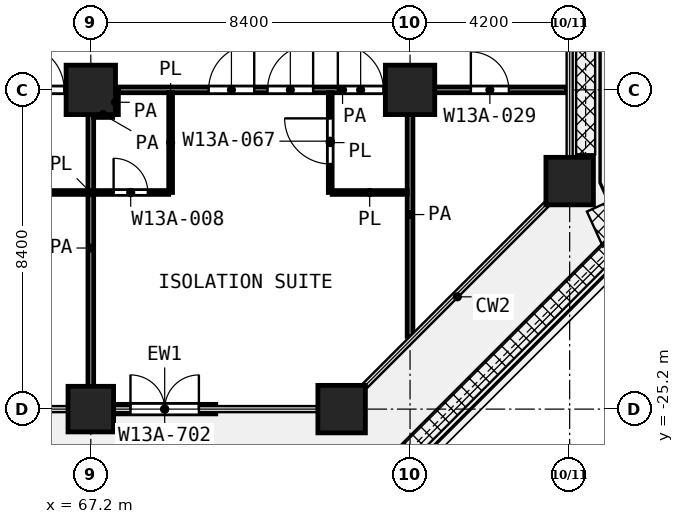
"""IFC4 building model, lengths in metres.
Left out: names, types, materials, properties, quantities, classifications, styles, units other than length and angle.
Written with IfcOpenShell. Run it as: python <this file> out.ifc"""

import sys

from ifc_helpers import new_model, si_unit, direction, frame, frame_2d, origin, origin_2d, place, context, subcontext, project, spatial, rectangle, extrude, element, fill, save


model = new_model("IFC4")
c1 = context("Model", 3, precision=1e-05, world=origin(), true_north=direction((0.0, 1.0)))
c2 = subcontext(c1, "Body", "Model", "MODEL_VIEW")
j1 = project(units=[si_unit("LENGTHUNIT", "METRE"), si_unit("PLANEANGLEUNIT", "RADIAN")], contexts=[c1])
p1 = place(None, origin())
s1 = spatial("IfcSite", under=j1, at=p1, CompositionType="ELEMENT")
p2 = place(p1, origin())
s2 = spatial("IfcBuilding", under=s1, at=p2, CompositionType="ELEMENT")
p3 = place(p2, frame((0.0, 0.0, 60.2)))
s3 = spatial("IfcBuildingStorey", under=s2, at=p3, CompositionType="ELEMENT", Elevation=60.2)
for number, where, z_axis, x_axis in (
    (1, (67.2, -16.8, 0.0), (0.0, 0.0, 1.0), (1.0, 0.0, 0.0)),
    (2, (75.6, -16.8, 0.0), (0.0, 0.0, 1.0), (1.0, 0.0, 0.0)),
):
    element("IfcColumn", number, at=place(p3, frame(where, z_axis=z_axis, x_axis=x_axis)), inside=s3, PredefinedType="COLUMN", context=c2, shape_type="SweptSolid", body=[
        extrude(rectangle(XDim=1.3, YDim=1.3, at=origin_2d()), origin(), (0.0, 0.0, 1.0), 4.2),
    ])
p4 = place(p3, frame((79.8, -19.2, 0.0), z_axis=(0.0, 0.0, 1.0), x_axis=(1.0, 0.0, 0.0)))
e3 = element("IfcColumn", 3, at=p4, inside=s3, PredefinedType="COLUMN", context=c2, shape_type="SweptSolid", body=[
    extrude(rectangle(XDim=1.25, YDim=1.25, at=origin_2d()), origin(), (0.0, 0.0, 1.0), 4.2),
])
p5 = place(p3, frame((67.2, -25.2, 0.0), z_axis=(0.0, 0.0, 1.0), x_axis=(1.0, 0.0, 0.0)))
e4 = element("IfcColumn", 4, at=p5, inside=s3, PredefinedType="COLUMN", context=c2, shape_type="SweptSolid", body=[
    extrude(rectangle(XDim=1.2, YDim=1.2, at=origin_2d()), origin(), (0.0, 0.0, 1.0), 4.2),
])
p6 = place(p3, frame((73.8, -25.2, 0.0), z_axis=(0.0, 0.0, 1.0), x_axis=(1.0, 0.0, 0.0)))
e5 = element("IfcColumn", 5, at=p6, inside=s3, PredefinedType="COLUMN", context=c2, shape_type="SweptSolid", body=[
    extrude(rectangle(XDim=1.25, YDim=1.25, at=origin_2d()), origin(), (0.0, 0.0, 1.0), 4.2),
])
p7 = place(p3, frame((67.8, -25.2, 0.0), z_axis=(0.0, 0.0, 1.0), x_axis=(1.0, 0.0, 0.0)))
e6 = element("IfcWall", 6, at=p7, inside=s3, PredefinedType="SOLIDWALL", context=c2, shape_type="SweptSolid", body=[
    extrude(rectangle(XDim=2.688, YDim=0.25, at=frame_2d((1.344, 0.0))), origin(), (0.0, 0.0, 1.0), 3.78),
])
p8 = place(p7, frame((0.444, 0.0, 0.0)))
e7 = element("IfcOpeningElement", 7, at=p8, cuts=e6, PredefinedType="OPENING", context=c2, shape_type="SweptSolid", body=[
    extrude(rectangle(XDim=1.8, YDim=2.1, at=frame_2d((0.9, 1.05))), frame((0.0, 0.135, 0.0), z_axis=(0.0, -1.0, 0.0), x_axis=(1.0, 0.0, 0.0)), (0.0, 0.0, 1.0), 0.27),
])
p9 = place(p3, frame((65.15, -19.5, 0.0), z_axis=(0.0, 0.0, 1.0), x_axis=(1.0, 0.0, 0.0)))
e8 = element("IfcWall", 8, at=p9, inside=s3, PredefinedType="PARTITIONING", context=c2, shape_type="SweptSolid", body=[
    extrude(rectangle(XDim=4.1, YDim=0.1, at=frame_2d((2.05, 0.0))), origin(), (0.0, 0.0, 1.0), 3.9),
])
p10 = place(p9, frame((2.65, 0.0, 0.0)))
e9 = element("IfcOpeningElement", 9, at=p10, cuts=e8, PredefinedType="OPENING", context=c2, shape_type="SweptSolid", body=[
    extrude(rectangle(XDim=0.9, YDim=2.1, at=frame_2d((0.45, 1.05))), frame((0.0, 0.06, 0.0), z_axis=(0.0, -1.0, 0.0), x_axis=(1.0, 0.0, 0.0)), (0.0, 0.0, 1.0), 0.12),
])
p11 = place(p3, frame((73.55, -19.5, 0.0), z_axis=(0.0, 0.0, 1.0), x_axis=(1.0, 0.0, 0.0)))
e10 = element("IfcWall", 10, at=p11, inside=s3, PredefinedType="PARTITIONING", context=c2, shape_type="SweptSolid", body=[
    extrude(rectangle(XDim=1.975, YDim=0.1, at=frame_2d((0.987, 0.0))), origin(), (0.0, 0.0, 1.0), 3.9),
])
p12 = place(p3, frame((69.3, -19.5, 0.0), z_axis=(0.0, 0.0, 1.0), x_axis=(0.0, 1.0, 0.0)))
e11 = element("IfcWall", 11, at=p12, inside=s3, PredefinedType="PARTITIONING", context=c2, shape_type="SweptSolid", body=[
    extrude(rectangle(XDim=2.625, YDim=0.1, at=frame_2d((1.312, 0.0))), origin(), (0.0, 0.0, 1.0), 3.9),
])
p13 = place(p3, frame((73.5, -19.5, 0.0), z_axis=(0.0, 0.0, 1.0), x_axis=(0.0, 1.0, 0.0)))
e12 = element("IfcWall", 12, at=p13, inside=s3, PredefinedType="PARTITIONING", context=c2, shape_type="SweptSolid", body=[
    extrude(rectangle(XDim=2.625, YDim=0.1, at=frame_2d((1.312, 0.0))), origin(), (0.0, 0.0, 1.0), 3.9),
])
p14 = place(p13, frame((0.75, 0.0, 0.0)))
e13 = element("IfcOpeningElement", 13, at=p14, cuts=e12, PredefinedType="OPENING", context=c2, shape_type="SweptSolid", body=[
    extrude(rectangle(XDim=1.2, YDim=2.1, at=frame_2d((0.6, 1.05))), frame((0.0, 0.06, 0.0), z_axis=(0.0, -1.0, 0.0), x_axis=(1.0, 0.0, 0.0)), (0.0, 0.0, 1.0), 0.12),
])
p15 = place(p3, frame((67.275, -17.45, 0.0), z_axis=(0.0, 0.0, 1.0), x_axis=(1.0, 0.0, 0.0)))
e14 = element("IfcWall", 14, at=p15, inside=s3, PredefinedType="PARTITIONING", context=c2, shape_type="SweptSolid", body=[
    extrude(rectangle(XDim=0.5, YDim=0.15, at=frame_2d((0.25, 0.0))), origin(), (0.0, 0.0, 1.0), 3.9),
])
p16 = place(p3, frame((59.528, -16.8, 0.0), z_axis=(0.0, 0.0, 1.0), x_axis=(1.0, 0.0, 0.0)))
e15 = element("IfcWall", 15, at=p16, inside=s3, PredefinedType="PARTITIONING", context=c2, shape_type="SweptSolid", body=[
    extrude(rectangle(XDim=7.594, YDim=0.15, at=frame_2d((3.797, 0.0))), origin(), (0.0, 0.0, 1.0), 3.9),
])
p17 = place(p16, frame((3.922, 0.0, 0.0)))
e16 = element("IfcOpeningElement", 16, at=p17, cuts=e15, PredefinedType="OPENING", context=c2, shape_type="SweptSolid", body=[
    extrude(rectangle(XDim=1.2, YDim=2.1, at=frame_2d((0.6, 1.05))), frame((0.0, 0.085, 0.0), z_axis=(0.0, -1.0, 0.0), x_axis=(1.0, 0.0, 0.0)), (0.0, 0.0, 1.0), 0.17),
])
p18 = place(p16, frame((2.372, 0.0, 0.0)))
e17 = element("IfcOpeningElement", 17, at=p18, cuts=e15, PredefinedType="OPENING", context=c2, shape_type="SweptSolid", body=[
    extrude(rectangle(XDim=1.2, YDim=2.1, at=frame_2d((0.6, 1.05))), frame((0.0, 0.085, 0.0), z_axis=(0.0, -1.0, 0.0), x_axis=(1.0, 0.0, 0.0)), (0.0, 0.0, 1.0), 0.17),
])
p19 = place(p16, frame((5.772, 0.0, 0.0)))
e18 = element("IfcOpeningElement", 18, at=p19, cuts=e15, PredefinedType="OPENING", context=c2, shape_type="SweptSolid", body=[
    extrude(rectangle(XDim=1.2, YDim=2.1, at=frame_2d((0.6, 1.05))), frame((0.0, 0.085, 0.0), z_axis=(0.0, -1.0, 0.0), x_axis=(1.0, 0.0, 0.0)), (0.0, 0.0, 1.0), 0.17),
])
p20 = place(p3, frame((67.928, -16.8, 0.0), z_axis=(0.0, 0.0, 1.0), x_axis=(1.0, 0.0, 0.0)))
e19 = element("IfcWall", 19, at=p20, inside=s3, PredefinedType="PARTITIONING", context=c2, shape_type="SweptSolid", body=[
    extrude(rectangle(XDim=11.792, YDim=0.15, at=frame_2d((5.896, 0.0))), origin(), (0.0, 0.0, 1.0), 3.9),
])
p21 = place(p20, frame((3.922, 0.0, 0.0)))
e20 = element("IfcOpeningElement", 20, at=p21, cuts=e19, PredefinedType="OPENING", context=c2, shape_type="SweptSolid", body=[
    extrude(rectangle(XDim=1.2, YDim=2.1, at=frame_2d((0.6, 1.05))), frame((0.0, 0.085, 0.0), z_axis=(0.0, -1.0, 0.0), x_axis=(1.0, 0.0, 0.0)), (0.0, 0.0, 1.0), 0.17),
])
p22 = place(p20, frame((2.372, 0.0, 0.0)))
e21 = element("IfcOpeningElement", 21, at=p22, cuts=e19, PredefinedType="OPENING", context=c2, shape_type="SweptSolid", body=[
    extrude(rectangle(XDim=1.2, YDim=2.1, at=frame_2d((0.6, 1.05))), frame((0.0, 0.085, 0.0), z_axis=(0.0, -1.0, 0.0), x_axis=(1.0, 0.0, 0.0)), (0.0, 0.0, 1.0), 0.17),
])
p23 = place(p20, frame((5.772, 0.0, 0.0)))
e22 = element("IfcOpeningElement", 22, at=p23, cuts=e19, PredefinedType="OPENING", context=c2, shape_type="SweptSolid", body=[
    extrude(rectangle(XDim=1.2, YDim=2.1, at=frame_2d((0.6, 1.05))), frame((0.0, 0.085, 0.0), z_axis=(0.0, -1.0, 0.0), x_axis=(1.0, 0.0, 0.0)), (0.0, 0.0, 1.0), 0.17),
])
p24 = place(p20, frame((9.272, 0.0, 0.0)))
e23 = element("IfcOpeningElement", 23, at=p24, cuts=e19, PredefinedType="OPENING", context=c2, shape_type="SweptSolid", body=[
    extrude(rectangle(XDim=1.0, YDim=2.1, at=frame_2d((0.5, 1.05))), frame((0.0, 0.085, 0.0), z_axis=(0.0, -1.0, 0.0), x_axis=(1.0, 0.0, 0.0)), (0.0, 0.0, 1.0), 0.17),
])
p25 = place(p3, frame((67.2, -25.12, 0.0), z_axis=(0.0, 0.0, 1.0), x_axis=(0.0, 1.0, 0.0)))
e24 = element("IfcWall", 24, at=p25, inside=s3, PredefinedType="PARTITIONING", context=c2, shape_type="SweptSolid", body=[
    extrude(rectangle(XDim=8.317, YDim=0.15, at=frame_2d((4.159, 0.0))), origin(), (0.0, 0.0, 1.0), 3.9),
])
p26 = place(p3, frame((67.85, -17.45, 0.0), z_axis=(0.0, 0.0, 1.0), x_axis=(0.0, 1.0, 0.0)))
e25 = element("IfcWall", 25, at=p26, inside=s3, PredefinedType="PARTITIONING", context=c2, shape_type="SweptSolid", body=[
    extrude(rectangle(XDim=0.647, YDim=0.15, at=frame_2d((0.323, 0.0))), origin(), (0.0, 0.0, 1.0), 3.9),
])
p27 = place(p3, frame((75.6, -23.287, 0.0), z_axis=(0.0, 0.0, 1.0), x_axis=(0.0, 1.0, 0.0)))
e26 = element("IfcWall", 26, at=p27, inside=s3, PredefinedType="PARTITIONING", context=c2, shape_type="SweptSolid", body=[
    extrude(rectangle(XDim=6.412, YDim=0.15, at=frame_2d((3.206, 0.0))), origin(), (0.0, 0.0, 1.0), 3.9),
])
p28 = place(p8, origin())
e27 = element("IfcDoor", 27, at=p28, inside=s3, OperationType="DOUBLE_DOOR_SINGLE_SWING", PredefinedType="DOOR", context=c2, shape_type="SweptSolid", body=[
    extrude(rectangle(XDim=1.8, YDim=2.1, at=frame_2d((0.9, 1.05))), frame((0.0, 0.025, 0.0), z_axis=(0.0, -1.0, 0.0), x_axis=(1.0, 0.0, 0.0)), (0.0, 0.0, 1.0), 0.05),
])
fill(e7, e27)
p29 = place(p19, origin())
e28 = element("IfcDoor", 28, at=p29, inside=s3, OperationType="SINGLE_SWING_LEFT", PredefinedType="DOOR", context=c2, shape_type="SweptSolid", body=[
    extrude(rectangle(XDim=1.2, YDim=2.1, at=frame_2d((0.6, 1.05))), frame((0.0, 0.025, 0.0), z_axis=(0.0, -1.0, 0.0), x_axis=(1.0, 0.0, 0.0)), (0.0, 0.0, 1.0), 0.05),
])
fill(e18, e28)
p30 = place(p21, origin())
e29 = element("IfcDoor", 29, at=p30, inside=s3, OperationType="SINGLE_SWING_RIGHT", PredefinedType="DOOR", context=c2, shape_type="SweptSolid", body=[
    extrude(rectangle(XDim=1.2, YDim=2.1, at=frame_2d((0.6, 1.05))), frame((0.0, 0.025, 0.0), z_axis=(0.0, -1.0, 0.0), x_axis=(1.0, 0.0, 0.0)), (0.0, 0.0, 1.0), 0.05),
])
fill(e20, e29)
p31 = place(p22, origin())
e30 = element("IfcDoor", 30, at=p31, inside=s3, OperationType="SINGLE_SWING_RIGHT", PredefinedType="DOOR", context=c2, shape_type="SweptSolid", body=[
    extrude(rectangle(XDim=1.2, YDim=2.1, at=frame_2d((0.6, 1.05))), frame((0.0, 0.025, 0.0), z_axis=(0.0, -1.0, 0.0), x_axis=(1.0, 0.0, 0.0)), (0.0, 0.0, 1.0), 0.05),
])
fill(e21, e30)
p32 = place(p23, origin())
e31 = element("IfcDoor", 31, at=p32, inside=s3, OperationType="SINGLE_SWING_LEFT", PredefinedType="DOOR", context=c2, shape_type="SweptSolid", body=[
    extrude(rectangle(XDim=1.2, YDim=2.1, at=frame_2d((0.6, 1.05))), frame((0.0, 0.025, 0.0), z_axis=(0.0, -1.0, 0.0), x_axis=(1.0, 0.0, 0.0)), (0.0, 0.0, 1.0), 0.05),
])
fill(e22, e31)
p33 = place(p14, origin())
e32 = element("IfcDoor", 32, at=p33, inside=s3, OperationType="SINGLE_SWING_RIGHT", PredefinedType="DOOR", context=c2, shape_type="SweptSolid", body=[
    extrude(rectangle(XDim=1.2, YDim=2.1, at=frame_2d((0.6, 1.05))), frame((0.0, 0.025, 0.0), z_axis=(0.0, -1.0, 0.0), x_axis=(1.0, 0.0, 0.0)), (0.0, 0.0, 1.0), 0.05),
])
fill(e13, e32)
p34 = place(p10, origin())
e33 = element("IfcDoor", 33, at=p34, inside=s3, OperationType="SINGLE_SWING_LEFT", PredefinedType="DOOR", context=c2, shape_type="SweptSolid", body=[
    extrude(rectangle(XDim=0.9, YDim=2.1, at=frame_2d((0.45, 1.05))), frame((0.0, 0.025, 0.0), z_axis=(0.0, -1.0, 0.0), x_axis=(1.0, 0.0, 0.0)), (0.0, 0.0, 1.0), 0.05),
])
fill(e9, e33)
p35 = place(p24, origin())
e34 = element("IfcDoor", 34, at=p35, inside=s3, OperationType="SINGLE_SWING_LEFT", PredefinedType="DOOR", context=c2, shape_type="SweptSolid", body=[
    extrude(rectangle(XDim=1.0, YDim=2.1, at=frame_2d((0.5, 1.05))), frame((0.0, 0.025, 0.0), z_axis=(0.0, -1.0, 0.0), x_axis=(1.0, 0.0, 0.0)), (0.0, 0.0, 1.0), 0.05),
])
fill(e23, e34)
save(model, sys.argv[1])
